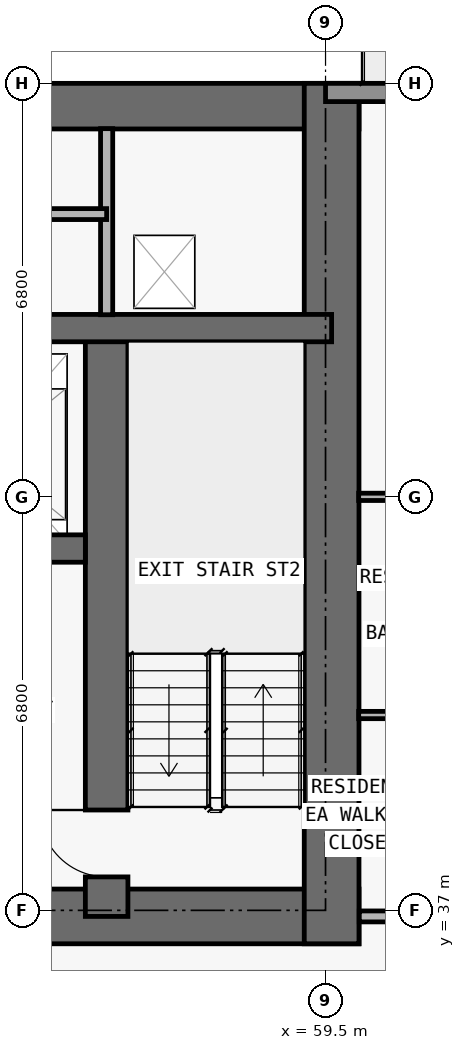
"""IFC4 building model, lengths in metres.
Left out: names, types, materials, properties, quantities, classifications, styles, units other than length and angle.
Written with IfcOpenShell. Run it as: python <this file> out.ifc"""

import sys

from ifc_helpers import new_model, si_unit, direction, frame, frame_2d, origin, place, context, subcontext, project, spatial, rectangle, extrude, element, fill, save


model = new_model("IFC4")
c1 = context("Model", 3, precision=1e-05, world=origin(), true_north=direction((0.0, 1.0)))
c2 = subcontext(c1, "Body", "Model", "MODEL_VIEW")
j1 = project(units=[si_unit("LENGTHUNIT", "METRE"), si_unit("PLANEANGLEUNIT", "RADIAN")], contexts=[c1])
p1 = place(None, origin())
s1 = spatial("IfcSite", under=j1, at=p1, CompositionType="ELEMENT")
p2 = place(p1, origin())
s2 = spatial("IfcBuilding", under=s1, at=p2, CompositionType="ELEMENT")
p3 = place(p2, frame((0.0, 0.0, 66.3)))
s3 = spatial("IfcBuildingStorey", under=s2, at=p3, CompositionType="ELEMENT", Elevation=66.3)
p4 = place(p3, frame((17.75, 36.9, 0.0), z_axis=(0.0, 0.0, 1.0), x_axis=(1.0, 0.0, 0.0)))
e1 = element("IfcWall", 1, at=p4, inside=s3, PredefinedType="SHEAR", context=c2, shape_type="SweptSolid", body=[
    extrude(rectangle(XDim=42.3, YDim=0.9, at=frame_2d((21.15, 0.0))), origin(), (0.0, 0.0, 1.0), 3.05),
])
p5 = place(p4, frame((14.55, 0.0, 0.0)))
e2 = element("IfcOpeningElement", 2, at=p5, cuts=e1, PredefinedType="OPENING", context=c2, shape_type="SweptSolid", body=[
    extrude(rectangle(XDim=1.1, YDim=2.15, at=frame_2d((0.55, 1.075))), frame((0.0, 0.46, 0.0), z_axis=(0.0, -1.0, 0.0), x_axis=(1.0, 0.0, 0.0)), (0.0, 0.0, 1.0), 0.92),
])
p6 = place(p4, frame((6.4, 0.0, 0.0)))
e3 = element("IfcOpeningElement", 3, at=p6, cuts=e1, PredefinedType="OPENING", context=c2, shape_type="SweptSolid", body=[
    extrude(rectangle(XDim=1.05, YDim=2.15, at=frame_2d((0.525, 1.075))), frame((0.0, 0.46, 0.0), z_axis=(0.0, -1.0, 0.0), x_axis=(1.0, 0.0, 0.0)), (0.0, 0.0, 1.0), 0.92),
])
p7 = place(p4, frame((34.9, 0.0, 0.0)))
e4 = element("IfcOpeningElement", 4, at=p7, cuts=e1, PredefinedType="OPENING", context=c2, shape_type="SweptSolid", body=[
    extrude(rectangle(XDim=1.05, YDim=2.15, at=frame_2d((0.525, 1.075))), frame((0.0, 0.46, 0.0), z_axis=(0.0, -1.0, 0.0), x_axis=(1.0, 0.0, 0.0)), (0.0, 0.0, 1.0), 0.92),
])
p8 = place(p4, frame((11.012, 0.0, 0.0)))
e5 = element("IfcOpeningElement", 5, at=p8, cuts=e1, PredefinedType="OPENING", context=c2, shape_type="SweptSolid", body=[
    extrude(rectangle(XDim=1.05, YDim=2.15, at=frame_2d((0.525, 1.075))), frame((0.0, 0.46, 0.0), z_axis=(0.0, -1.0, 0.0), x_axis=(1.0, 0.0, 0.0)), (0.0, 0.0, 1.0), 0.92),
])
p9 = place(p4, frame((24.25, 0.0, 0.0)))
e6 = element("IfcOpeningElement", 6, at=p9, cuts=e1, PredefinedType="OPENING", context=c2, shape_type="SweptSolid", body=[
    extrude(rectangle(XDim=1.05, YDim=2.15, at=frame_2d((0.525, 1.075))), frame((0.0, 0.46, 0.0), z_axis=(0.0, -1.0, 0.0), x_axis=(1.0, 0.0, 0.0)), (0.0, 0.0, 1.0), 0.92),
])
p10 = place(p3, frame((17.75, 50.225, 0.0), z_axis=(0.0, 0.0, 1.0), x_axis=(1.0, 0.0, 0.0)))
e7 = element("IfcWall", 7, at=p10, inside=s3, PredefinedType="SHEAR", context=c2, shape_type="SweptSolid", body=[
    extrude(rectangle(XDim=42.3, YDim=0.75, at=frame_2d((21.15, 0.0))), origin(), (0.0, 0.0, 1.0), 3.05),
])
p11 = place(p3, frame((59.6, 36.45, 0.0), z_axis=(0.0, 0.0, 1.0), x_axis=(0.0, 1.0, 0.0)))
e8 = element("IfcWall", 8, at=p11, inside=s3, PredefinedType="SHEAR", context=c2, shape_type="SweptSolid", body=[
    extrude(rectangle(XDim=14.15, YDim=0.9, at=frame_2d((7.075, 0.0))), origin(), (0.0, 0.0, 1.0), 3.05),
])
p12 = place(p3, frame((55.9, 36.9, 0.0), z_axis=(0.0, 0.0, 1.0), x_axis=(0.0, 1.0, 0.0)))
e9 = element("IfcWall", 9, at=p12, inside=s3, PredefinedType="SHEAR", context=c2, shape_type="SweptSolid", body=[
    extrude(rectangle(XDim=9.675, YDim=0.7, at=frame_2d((4.837, 0.0))), origin(), (0.0, 0.0, 1.0), 3.05),
])
p13 = place(p12, frame((0.65, 0.0, 0.0)))
e10 = element("IfcOpeningElement", 10, at=p13, cuts=e9, PredefinedType="OPENING", context=c2, shape_type="SweptSolid", body=[
    extrude(rectangle(XDim=1.1, YDim=2.15, at=frame_2d((0.55, 1.075))), frame((0.0, 0.36, 0.0), z_axis=(0.0, -1.0, 0.0), x_axis=(1.0, 0.0, 0.0)), (0.0, 0.0, 1.0), 0.72),
])
p14 = place(p3, frame((22.25, 42.95, 0.0), z_axis=(0.0, 0.0, 1.0), x_axis=(1.0, 0.0, 0.0)))
e11 = element("IfcWall", 11, at=p14, inside=s3, PredefinedType="SHEAR", context=c2, shape_type="SweptSolid", body=[
    extrude(rectangle(XDim=33.3, YDim=0.45, at=frame_2d((16.65, 0.0))), origin(), (0.0, 0.0, 1.0), 3.05),
])
p15 = place(p14, frame((1.05, 0.0, 0.0)))
e12 = element("IfcOpeningElement", 12, at=p15, cuts=e11, PredefinedType="OPENING", context=c2, shape_type="SweptSolid", body=[
    extrude(rectangle(XDim=1.2, YDim=2.2, at=frame_2d((0.6, 1.1))), frame((0.0, 0.235, 0.0), z_axis=(0.0, -1.0, 0.0), x_axis=(1.0, 0.0, 0.0)), (0.0, 0.0, 1.0), 0.47),
])
p16 = place(p14, frame((31.05, 0.0, 0.0)))
e13 = element("IfcOpeningElement", 13, at=p16, cuts=e11, PredefinedType="OPENING", context=c2, shape_type="SweptSolid", body=[
    extrude(rectangle(XDim=1.2, YDim=2.2, at=frame_2d((0.6, 1.1))), frame((0.0, 0.235, 0.0), z_axis=(0.0, -1.0, 0.0), x_axis=(1.0, 0.0, 0.0)), (0.0, 0.0, 1.0), 0.47),
])
p17 = place(p14, frame((13.5, 0.0, 0.0)))
e14 = element("IfcOpeningElement", 14, at=p17, cuts=e11, PredefinedType="OPENING", context=c2, shape_type="SweptSolid", body=[
    extrude(rectangle(XDim=1.1, YDim=2.2, at=frame_2d((0.55, 1.1))), frame((0.0, 0.235, 0.0), z_axis=(0.0, -1.0, 0.0), x_axis=(1.0, 0.0, 0.0)), (0.0, 0.0, 1.0), 0.47),
])
p18 = place(p14, frame((16.1, 0.0, 0.0)))
e15 = element("IfcOpeningElement", 15, at=p18, cuts=e11, PredefinedType="OPENING", context=c2, shape_type="SweptSolid", body=[
    extrude(rectangle(XDim=1.1, YDim=2.2, at=frame_2d((0.55, 1.1))), frame((0.0, 0.235, 0.0), z_axis=(0.0, -1.0, 0.0), x_axis=(1.0, 0.0, 0.0)), (0.0, 0.0, 1.0), 0.47),
])
p19 = place(p14, frame((18.7, 0.0, 0.0)))
e16 = element("IfcOpeningElement", 16, at=p19, cuts=e11, PredefinedType="OPENING", context=c2, shape_type="SweptSolid", body=[
    extrude(rectangle(XDim=1.1, YDim=2.2, at=frame_2d((0.55, 1.1))), frame((0.0, 0.235, 0.0), z_axis=(0.0, -1.0, 0.0), x_axis=(1.0, 0.0, 0.0)), (0.0, 0.0, 1.0), 0.47),
])
p20 = place(p14, frame((3.625, 0.0, 0.0)))
e17 = element("IfcOpeningElement", 17, at=p20, cuts=e11, PredefinedType="OPENING", context=c2, shape_type="SweptSolid", body=[
    extrude(rectangle(XDim=1.05, YDim=2.15, at=frame_2d((0.525, 1.075))), frame((0.0, 0.235, 0.0), z_axis=(0.0, -1.0, 0.0), x_axis=(1.0, 0.0, 0.0)), (0.0, 0.0, 1.0), 0.47),
])
p21 = place(p14, frame((28.675, 0.0, 0.0)))
e18 = element("IfcOpeningElement", 18, at=p21, cuts=e11, PredefinedType="OPENING", context=c2, shape_type="SweptSolid", body=[
    extrude(rectangle(XDim=1.05, YDim=2.15, at=frame_2d((0.525, 1.075))), frame((0.0, 0.235, 0.0), z_axis=(0.0, -1.0, 0.0), x_axis=(1.0, 0.0, 0.0)), (0.0, 0.0, 1.0), 0.47),
])
p22 = place(p3, frame((18.2, 46.575, 0.0), z_axis=(0.0, 0.0, 1.0), x_axis=(1.0, 0.0, 0.0)))
e19 = element("IfcWall", 19, at=p22, inside=s3, PredefinedType="SHEAR", context=c2, shape_type="SweptSolid", body=[
    extrude(rectangle(XDim=41.4, YDim=0.45, at=frame_2d((20.7, 0.0))), origin(), (0.0, 0.0, 1.0), 3.05),
])
p23 = place(p22, frame((7.675, 0.0, 0.0)))
e20 = element("IfcOpeningElement", 20, at=p23, cuts=e19, PredefinedType="OPENING", context=c2, shape_type="SweptSolid", body=[
    extrude(rectangle(XDim=1.05, YDim=2.15, at=frame_2d((0.525, 1.075))), frame((0.0, 0.235, 0.0), z_axis=(0.0, -1.0, 0.0), x_axis=(1.0, 0.0, 0.0)), (0.0, 0.0, 1.0), 0.47),
])
p24 = place(p22, frame((32.725, 0.0, 0.0)))
e21 = element("IfcOpeningElement", 21, at=p24, cuts=e19, PredefinedType="OPENING", context=c2, shape_type="SweptSolid", body=[
    extrude(rectangle(XDim=1.05, YDim=2.15, at=frame_2d((0.525, 1.075))), frame((0.0, 0.235, 0.0), z_axis=(0.0, -1.0, 0.0), x_axis=(1.0, 0.0, 0.0)), (0.0, 0.0, 1.0), 0.47),
])
p25 = place(p3, frame((59.5, 50.45, 0.0), z_axis=(0.0, 0.0, 1.0), x_axis=(1.0, 0.0, 0.0)))
e22 = element("IfcWall", 22, at=p25, inside=s3, PredefinedType="STANDARD", context=c2, shape_type="SweptSolid", body=[
    extrude(rectangle(XDim=13.2, YDim=0.3, at=frame_2d((6.6, 0.0))), origin(), (0.0, 0.0, 1.0), 3.05),
])
p26 = place(p25, frame((5.6, 0.0, 0.0)))
e23 = element("IfcOpeningElement", 23, at=p26, cuts=e22, PredefinedType="OPENING", context=c2, shape_type="SweptSolid", body=[
    extrude(rectangle(XDim=2.0, YDim=2.3, at=frame_2d((1.0, 1.15))), frame((0.0, 0.16, 0.0), z_axis=(0.0, -1.0, 0.0), x_axis=(1.0, 0.0, 0.0)), (0.0, 0.0, 1.0), 0.32),
])
p27 = place(p3, frame((55.9, 46.795, 0.0), z_axis=(0.0, 0.0, 1.0), x_axis=(0.0, 1.0, 0.0)))
e24 = element("IfcWall", 24, at=p27, inside=s3, PredefinedType="PARTITIONING", context=c2, shape_type="SweptSolid", body=[
    extrude(rectangle(XDim=3.06, YDim=0.2, at=frame_2d((1.53, 0.0))), origin(), (0.0, 0.0, 1.0), 3.05),
])
p28 = place(p3, frame((60.055, 36.9, 0.0), z_axis=(0.0, 0.0, 1.0), x_axis=(1.0, 0.0, 0.0)))
e25 = element("IfcWall", 25, at=p28, inside=s3, PredefinedType="PARTITIONING", context=c2, shape_type="SweptSolid", body=[
    extrude(rectangle(XDim=12.645, YDim=0.18, at=frame_2d((6.323, 0.0))), origin(), (0.0, 0.0, 1.0), 3.05),
])
p29 = place(p28, frame((4.52, 0.0, 0.0)))
e26 = element("IfcOpeningElement", 26, at=p29, cuts=e25, PredefinedType="OPENING", context=c2, shape_type="SweptSolid", body=[
    extrude(rectangle(XDim=1.0, YDim=2.2, at=frame_2d((0.5, 1.1))), frame((0.0, 0.1, 0.0), z_axis=(0.0, -1.0, 0.0), x_axis=(1.0, 0.0, 0.0)), (0.0, 0.0, 1.0), 0.2),
])
p30 = place(p3, frame((60.045, 40.212, 0.0), z_axis=(0.0, 0.0, 1.0), x_axis=(1.0, 0.0, 0.0)))
e27 = element("IfcWall", 27, at=p30, inside=s3, PredefinedType="PARTITIONING", context=c2, shape_type="SweptSolid", body=[
    extrude(rectangle(XDim=2.205, YDim=0.12, at=frame_2d((1.103, 0.0))), origin(), (0.0, 0.0, 1.0), 3.05),
])
p31 = place(p3, frame((60.045, 43.8, 0.0), z_axis=(0.0, 0.0, 1.0), x_axis=(1.0, 0.0, 0.0)))
e28 = element("IfcWall", 28, at=p31, inside=s3, PredefinedType="PARTITIONING", context=c2, shape_type="SweptSolid", body=[
    extrude(rectangle(XDim=15.96, YDim=0.12, at=frame_2d((7.98, 0.0))), origin(), (0.0, 0.0, 1.0), 2.339),
])
p32 = place(p31, frame((9.805, 0.0, 0.0)))
e29 = element("IfcOpeningElement", 29, at=p32, cuts=e28, PredefinedType="OPENING", context=c2, shape_type="SweptSolid", body=[
    extrude(rectangle(XDim=0.9, YDim=2.15, at=frame_2d((0.45, 1.075))), frame((0.0, 0.07, 0.0), z_axis=(0.0, -1.0, 0.0), x_axis=(1.0, 0.0, 0.0)), (0.0, 0.0, 1.0), 0.14),
])
p33 = place(p31, frame((4.58, 0.0, 0.0)))
e30 = element("IfcOpeningElement", 30, at=p33, cuts=e28, PredefinedType="OPENING", context=c2, shape_type="SweptSolid", body=[
    extrude(rectangle(XDim=0.9, YDim=2.15, at=frame_2d((0.45, 1.075))), frame((0.0, 0.07, 0.0), z_axis=(0.0, -1.0, 0.0), x_axis=(1.0, 0.0, 0.0)), (0.0, 0.0, 1.0), 0.14),
])
p34 = place(p31, frame((0.677, 0.0, 0.0)))
e31 = element("IfcOpeningElement", 31, at=p34, cuts=e28, PredefinedType="OPENING", context=c2, shape_type="SweptSolid", body=[
    extrude(rectangle(XDim=0.85, YDim=2.1, at=frame_2d((0.425, 1.05))), frame((0.0, 0.07, 0.0), z_axis=(0.0, -1.0, 0.0), x_axis=(1.0, 0.0, 0.0)), (0.0, 0.0, 1.0), 0.14),
])
p35 = place(p3, frame((26.7, 48.45, 0.0), z_axis=(0.0, 0.0, 1.0), x_axis=(1.0, 0.0, 0.0)))
e32 = element("IfcWall", 32, at=p35, inside=s3, PredefinedType="PARTITIONING", context=c2, shape_type="SweptSolid", body=[
    extrude(rectangle(XDim=29.2, YDim=0.18, at=frame_2d((14.6, 0.0))), origin(), (0.0, 0.0, 1.0), 3.05),
])
p36 = place(p35, frame((1.75, 0.0, 0.0)))
e33 = element("IfcOpeningElement", 33, at=p36, cuts=e32, PredefinedType="OPENING", context=c2, shape_type="SweptSolid", body=[
    extrude(rectangle(XDim=1.2, YDim=2.2, at=frame_2d((0.6, 1.1))), frame((0.0, 0.1, 0.0), z_axis=(0.0, -1.0, 0.0), x_axis=(1.0, 0.0, 0.0)), (0.0, 0.0, 1.0), 0.2),
])
p37 = place(p35, frame((6.475, 0.0, 0.0)))
e34 = element("IfcOpeningElement", 34, at=p37, cuts=e32, PredefinedType="OPENING", context=c2, shape_type="SweptSolid", body=[
    extrude(rectangle(XDim=1.2, YDim=2.2, at=frame_2d((0.6, 1.1))), frame((0.0, 0.1, 0.0), z_axis=(0.0, -1.0, 0.0), x_axis=(1.0, 0.0, 0.0)), (0.0, 0.0, 1.0), 0.2),
])
p38 = place(p35, frame((14.05, 0.0, 0.0)))
e35 = element("IfcOpeningElement", 35, at=p38, cuts=e32, PredefinedType="OPENING", context=c2, shape_type="SweptSolid", body=[
    extrude(rectangle(XDim=1.0, YDim=2.2, at=frame_2d((0.5, 1.1))), frame((0.0, 0.1, 0.0), z_axis=(0.0, -1.0, 0.0), x_axis=(1.0, 0.0, 0.0)), (0.0, 0.0, 1.0), 0.2),
])
p39 = place(p35, frame((21.425, 0.0, 0.0)))
e36 = element("IfcOpeningElement", 36, at=p39, cuts=e32, PredefinedType="OPENING", context=c2, shape_type="SweptSolid", body=[
    extrude(rectangle(XDim=1.2, YDim=2.2, at=frame_2d((0.6, 1.1))), frame((0.0, 0.1, 0.0), z_axis=(0.0, -1.0, 0.0), x_axis=(1.0, 0.0, 0.0)), (0.0, 0.0, 1.0), 0.2),
])
p40 = place(p35, frame((26.375, 0.0, 0.0)))
e37 = element("IfcOpeningElement", 37, at=p40, cuts=e32, PredefinedType="OPENING", context=c2, shape_type="SweptSolid", body=[
    extrude(rectangle(XDim=0.85, YDim=2.1, at=frame_2d((0.425, 1.05))), frame((0.0, 0.1, 0.0), z_axis=(0.0, -1.0, 0.0), x_axis=(1.0, 0.0, 0.0)), (0.0, 0.0, 1.0), 0.2),
])
p41 = place(p13, origin())
e38 = element("IfcDoor", 38, at=p41, inside=s3, OperationType="SINGLE_SWING_RIGHT", PredefinedType="DOOR", context=c2, shape_type="SweptSolid", body=[
    extrude(rectangle(XDim=1.1, YDim=2.15, at=frame_2d((0.55, 1.075))), frame((0.0, 0.025, 0.0), z_axis=(0.0, -1.0, 0.0), x_axis=(1.0, 0.0, 0.0)), (0.0, 0.0, 1.0), 0.05),
])
fill(e10, e38)
save(model, sys.argv[1])
